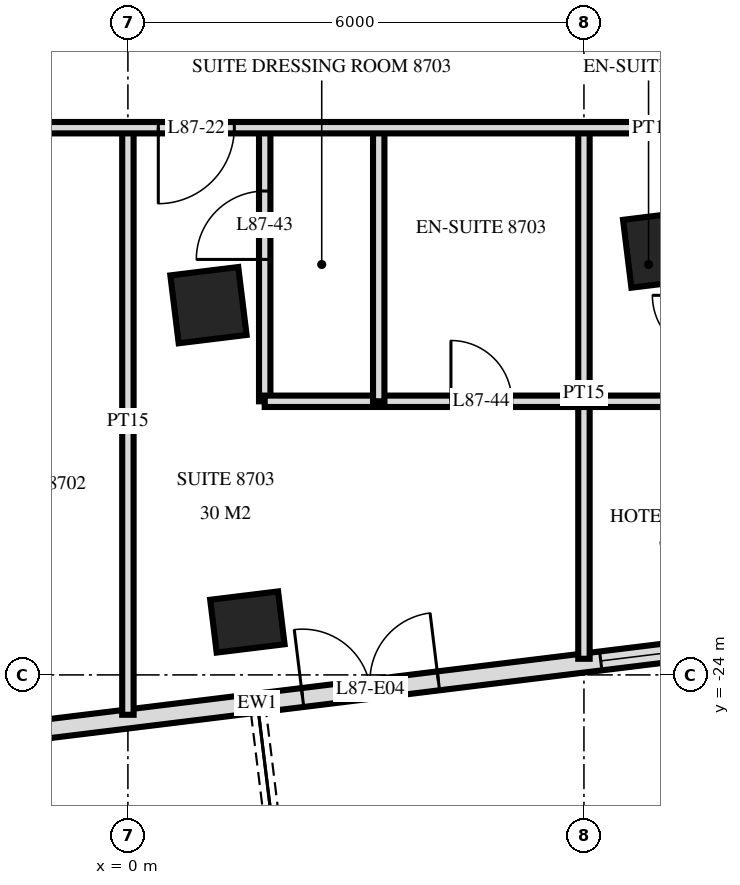
"""IFC4 building model, lengths in metres.
Left out: names, types, materials, properties, quantities, classifications, styles, units other than length and angle.
Written with IfcOpenShell. Run it as: python <this file> out.ifc"""

import sys

from ifc_helpers import new_model, si_unit, direction, frame, frame_2d, origin, origin_2d, place, context, subcontext, project, spatial, rectangle, extrude, element, fill, save


model = new_model("IFC4")
c1 = context("Model", 3, precision=1e-05, world=origin(), true_north=direction((0.0, 1.0)))
c2 = subcontext(c1, "Body", "Model", "MODEL_VIEW")
j1 = project(units=[si_unit("LENGTHUNIT", "METRE"), si_unit("PLANEANGLEUNIT", "RADIAN")], contexts=[c1])
p1 = place(None, origin())
s1 = spatial("IfcSite", under=j1, at=p1, CompositionType="ELEMENT")
p2 = place(p1, origin())
s2 = spatial("IfcBuilding", under=s1, at=p2, CompositionType="ELEMENT")
p3 = place(p2, frame((0.0, 0.0, 330.6)))
s3 = spatial("IfcBuildingStorey", under=s2, at=p3, CompositionType="ELEMENT", Elevation=330.6)
p4 = place(p3, frame((1.06, -19.135, 0.0), z_axis=(0.0, 0.0, 1.0), x_axis=(0.992546151641, 0.121869343405, 0.0)))
e1 = element("IfcColumn", 1, at=p4, inside=s3, PredefinedType="COLUMN", context=c2, shape_type="SweptSolid", body=[
    extrude(rectangle(XDim=0.9, YDim=0.9, at=origin_2d()), origin(), (0.0, 0.0, 1.0), 4.0),
])
p5 = place(p3, frame((1.572, -23.304, 0.0), z_axis=(0.0, 0.0, 1.0), x_axis=(0.992546151641, 0.121869343405, 0.0)))
e2 = element("IfcColumn", 2, at=p5, inside=s3, PredefinedType="COLUMN", context=c2, shape_type="SweptSolid", body=[
    extrude(rectangle(XDim=0.9, YDim=0.7, at=origin_2d()), origin(), (0.0, 0.0, 1.0), 4.0),
])
p6 = place(p3, frame((7.016, -18.404, 0.0), z_axis=(0.0, 0.0, 1.0), x_axis=(0.992546151641, 0.121869343405, 0.0)))
e3 = element("IfcColumn", 3, at=p6, inside=s3, PredefinedType="COLUMN", context=c2, shape_type="SweptSolid", body=[
    extrude(rectangle(XDim=0.9, YDim=0.9, at=origin_2d()), origin(), (0.0, 0.0, 1.0), 4.0),
])
p7 = place(p3, frame((-16.138, -26.561, 0.0), z_axis=(0.0, 0.0, 1.0), x_axis=(0.992546726876, 0.121864658405, 0.0)))
e4 = element("IfcWall", 4, at=p7, inside=s3, PredefinedType="SOLIDWALL", context=c2, shape_type="SweptSolid", body=[
    extrude(rectangle(XDim=35.951, YDim=0.25, at=frame_2d((17.975, 0.0))), origin(), (0.0, 0.0, 1.0), 3.72),
])
p8 = place(p7, frame((0.575, 0.0, 0.0)))
e5 = element("IfcOpeningElement", 5, at=p8, cuts=e4, PredefinedType="OPENING", context=c2, shape_type="SweptSolid", body=[
    extrude(rectangle(XDim=1.8, YDim=2.4, at=frame_2d((0.9, 1.2))), frame((0.0, 0.135, 0.0), z_axis=(0.0, -1.0, 0.0), x_axis=(1.0, 0.0, 0.0)), (0.0, 0.0, 1.0), 0.27),
])
p9 = place(p7, frame((6.576, 0.0, 0.0)))
e6 = element("IfcOpeningElement", 6, at=p9, cuts=e4, PredefinedType="OPENING", context=c2, shape_type="SweptSolid", body=[
    extrude(rectangle(XDim=1.8, YDim=2.4, at=frame_2d((0.9, 1.2))), frame((0.0, 0.135, 0.0), z_axis=(0.0, -1.0, 0.0), x_axis=(1.0, 0.0, 0.0)), (0.0, 0.0, 1.0), 0.27),
])
p10 = place(p7, frame((12.575, 0.0, 0.0)))
e7 = element("IfcOpeningElement", 7, at=p10, cuts=e4, PredefinedType="OPENING", context=c2, shape_type="SweptSolid", body=[
    extrude(rectangle(XDim=1.8, YDim=2.4, at=frame_2d((0.9, 1.2))), frame((0.0, 0.135, 0.0), z_axis=(0.0, -1.0, 0.0), x_axis=(1.0, 0.0, 0.0)), (0.0, 0.0, 1.0), 0.27),
])
p11 = place(p7, frame((18.575, 0.0, 0.0)))
e8 = element("IfcOpeningElement", 8, at=p11, cuts=e4, PredefinedType="OPENING", context=c2, shape_type="SweptSolid", body=[
    extrude(rectangle(XDim=1.8, YDim=2.4, at=frame_2d((0.9, 1.2))), frame((0.0, 0.135, 0.0), z_axis=(0.0, -1.0, 0.0), x_axis=(1.0, 0.0, 0.0)), (0.0, 0.0, 1.0), 0.27),
])
p12 = place(p7, frame((22.528, 0.0, 0.0)))
e9 = element("IfcOpeningElement", 9, at=p12, cuts=e4, PredefinedType="OPENING", context=c2, shape_type="SweptSolid", body=[
    extrude(rectangle(XDim=1.2, YDim=2.4, at=frame_2d((0.6, 1.2))), frame((0.0, 0.135, 0.0), z_axis=(0.0, -1.0, 0.0), x_axis=(1.0, 0.0, 0.0)), (0.0, 0.0, 1.0), 0.27),
])
p13 = place(p7, frame((25.923, 0.0, 0.0)))
e10 = element("IfcOpeningElement", 10, at=p13, cuts=e4, PredefinedType="OPENING", context=c2, shape_type="SweptSolid", body=[
    extrude(rectangle(XDim=1.8, YDim=2.4, at=frame_2d((0.9, 1.2))), frame((0.0, 0.135, 0.0), z_axis=(0.0, -1.0, 0.0), x_axis=(1.0, 0.0, 0.0)), (0.0, 0.0, 1.0), 0.27),
])
p14 = place(p7, frame((30.576, 0.0, 0.0)))
e11 = element("IfcOpeningElement", 11, at=p14, cuts=e4, PredefinedType="OPENING", context=c2, shape_type="SweptSolid", body=[
    extrude(rectangle(XDim=1.8, YDim=2.4, at=frame_2d((0.9, 1.2))), frame((0.0, 0.135, 0.0), z_axis=(0.0, -1.0, 0.0), x_axis=(1.0, 0.0, 0.0)), (0.0, 0.0, 1.0), 0.27),
])
p15 = place(p3, frame((6.0, -23.788, 0.0), z_axis=(0.0, 0.0, 1.0), x_axis=(0.0, 1.0, 0.0)))
e12 = element("IfcWall", 12, at=p15, inside=s3, PredefinedType="PARTITIONING", context=c2, shape_type="SweptSolid", body=[
    extrude(rectangle(XDim=6.988, YDim=0.15, at=frame_2d((3.494, 0.0))), origin(), (0.0, 0.0, 1.0), 3.72),
])
p16 = place(p3, frame((3.3, -20.4, 0.0), z_axis=(0.0, 0.0, 1.0), x_axis=(0.0, 1.0, 0.0)))
e13 = element("IfcWall", 13, at=p16, inside=s3, PredefinedType="PARTITIONING", context=c2, shape_type="SweptSolid", body=[
    extrude(rectangle(XDim=3.6, YDim=0.15, at=frame_2d((1.8, 0.0))), origin(), (0.0, 0.0, 1.0), 3.72),
])
p17 = place(p3, frame((1.8, -20.4, 0.0), z_axis=(0.0, 0.0, 1.0), x_axis=(0.0, 1.0, 0.0)))
e14 = element("IfcWall", 14, at=p17, inside=s3, PredefinedType="PARTITIONING", context=c2, shape_type="SweptSolid", body=[
    extrude(rectangle(XDim=3.6, YDim=0.15, at=frame_2d((1.8, 0.0))), origin(), (0.0, 0.0, 1.0), 3.72),
])
p18 = place(p17, frame((1.866, 0.0, 0.0)))
e15 = element("IfcOpeningElement", 15, at=p18, cuts=e14, PredefinedType="OPENING", context=c2, shape_type="SweptSolid", body=[
    extrude(rectangle(XDim=0.9, YDim=2.1, at=frame_2d((0.45, 1.05))), frame((0.0, 0.085, 0.0), z_axis=(0.0, -1.0, 0.0), x_axis=(1.0, 0.0, 0.0)), (0.0, 0.0, 1.0), 0.17),
])
p19 = place(p3, frame((0.0, -24.524, 0.0), z_axis=(0.0, 0.0, 1.0), x_axis=(0.0, 1.0, 0.0)))
e16 = element("IfcWall", 16, at=p19, inside=s3, PredefinedType="PARTITIONING", context=c2, shape_type="SweptSolid", body=[
    extrude(rectangle(XDim=7.724, YDim=0.15, at=frame_2d((3.862, 0.0))), origin(), (0.0, 0.0, 1.0), 3.72),
])
p20 = place(p3, frame((1.8, -20.4, 0.0), z_axis=(0.0, 0.0, 1.0), x_axis=(1.0, 0.0, 0.0)))
e17 = element("IfcWall", 17, at=p20, inside=s3, PredefinedType="PARTITIONING", context=c2, shape_type="SweptSolid", body=[
    extrude(rectangle(XDim=5.9, YDim=0.15, at=frame_2d((2.95, 0.0))), origin(), (0.0, 0.0, 1.0), 3.72),
])
p21 = place(p20, frame((2.45, 0.0, 0.0)))
e18 = element("IfcOpeningElement", 18, at=p21, cuts=e17, PredefinedType="OPENING", context=c2, shape_type="SweptSolid", body=[
    extrude(rectangle(XDim=0.8, YDim=2.1, at=frame_2d((0.4, 1.05))), frame((0.0, 0.085, 0.0), z_axis=(0.0, -1.0, 0.0), x_axis=(1.0, 0.0, 0.0)), (0.0, 0.0, 1.0), 0.17),
])
p22 = place(p3, frame((-9.3, -16.8, 0.0), z_axis=(0.0, 0.0, 1.0), x_axis=(1.0, 0.0, 0.0)))
e19 = element("IfcWall", 19, at=p22, inside=s3, PredefinedType="PARTITIONING", context=c2, shape_type="SweptSolid", body=[
    extrude(rectangle(XDim=32.561, YDim=0.15, at=frame_2d((16.281, 0.0))), origin(), (0.0, 0.0, 1.0), 3.72),
])
p23 = place(p22, frame((0.4, 0.0, 0.0)))
e20 = element("IfcOpeningElement", 20, at=p23, cuts=e19, PredefinedType="OPENING", context=c2, shape_type="SweptSolid", body=[
    extrude(rectangle(XDim=1.0, YDim=2.1, at=frame_2d((0.5, 1.05))), frame((0.0, 0.085, 0.0), z_axis=(0.0, -1.0, 0.0), x_axis=(1.0, 0.0, 0.0)), (0.0, 0.0, 1.0), 0.17),
])
p24 = place(p22, frame((7.15, 0.0, 0.0)))
e21 = element("IfcOpeningElement", 21, at=p24, cuts=e19, PredefinedType="OPENING", context=c2, shape_type="SweptSolid", body=[
    extrude(rectangle(XDim=1.0, YDim=2.1, at=frame_2d((0.5, 1.05))), frame((0.0, 0.085, 0.0), z_axis=(0.0, -1.0, 0.0), x_axis=(1.0, 0.0, 0.0)), (0.0, 0.0, 1.0), 0.17),
])
p25 = place(p22, frame((9.7, 0.0, 0.0)))
e22 = element("IfcOpeningElement", 22, at=p25, cuts=e19, PredefinedType="OPENING", context=c2, shape_type="SweptSolid", body=[
    extrude(rectangle(XDim=1.0, YDim=2.1, at=frame_2d((0.5, 1.05))), frame((0.0, 0.085, 0.0), z_axis=(0.0, -1.0, 0.0), x_axis=(1.0, 0.0, 0.0)), (0.0, 0.0, 1.0), 0.17),
])
p26 = place(p22, frame((17.149, 0.0, 0.0)))
e23 = element("IfcOpeningElement", 23, at=p26, cuts=e19, PredefinedType="OPENING", context=c2, shape_type="SweptSolid", body=[
    extrude(rectangle(XDim=1.0, YDim=2.1, at=frame_2d((0.5, 1.05))), frame((0.0, 0.085, 0.0), z_axis=(0.0, -1.0, 0.0), x_axis=(1.0, 0.0, 0.0)), (0.0, 0.0, 1.0), 0.17),
])
p27 = place(p22, frame((18.45, 0.0, 0.0)))
e24 = element("IfcOpeningElement", 24, at=p27, cuts=e19, PredefinedType="OPENING", context=c2, shape_type="SweptSolid", body=[
    extrude(rectangle(XDim=1.0, YDim=2.1, at=frame_2d((0.5, 1.05))), frame((0.0, 0.085, 0.0), z_axis=(0.0, -1.0, 0.0), x_axis=(1.0, 0.0, 0.0)), (0.0, 0.0, 1.0), 0.17),
])
p28 = place(p22, frame((24.98, 0.0, 0.0)))
e25 = element("IfcOpeningElement", 25, at=p28, cuts=e19, PredefinedType="OPENING", context=c2, shape_type="SweptSolid", body=[
    extrude(rectangle(XDim=1.0, YDim=2.1, at=frame_2d((0.5, 1.05))), frame((0.0, 0.085, 0.0), z_axis=(0.0, -1.0, 0.0), x_axis=(1.0, 0.0, 0.0)), (0.0, 0.0, 1.0), 0.17),
])
p29 = place(p11, origin())
e26 = element("IfcDoor", 26, at=p29, inside=s3, OperationType="DOUBLE_DOOR_SINGLE_SWING", PredefinedType="DOOR", context=c2, shape_type="SweptSolid", body=[
    extrude(rectangle(XDim=1.8, YDim=2.4, at=frame_2d((0.9, 1.2))), frame((0.0, 0.025, 0.0), z_axis=(0.0, -1.0, 0.0), x_axis=(1.0, 0.0, 0.0)), (0.0, 0.0, 1.0), 0.05),
])
fill(e8, e26)
p30 = place(p12, origin())
e27 = element("IfcWindow", 27, at=p30, inside=s3, PartitioningType="SINGLE_PANEL", PredefinedType="WINDOW", context=c2, shape_type="SweptSolid", body=[
    extrude(rectangle(XDim=1.2, YDim=2.4, at=frame_2d((0.6, 1.2))), frame((0.0, 0.03, 0.0), z_axis=(0.0, -1.0, 0.0), x_axis=(1.0, 0.0, 0.0)), (0.0, 0.0, 1.0), 0.06),
])
fill(e9, e27)
p31 = place(p25, frame((0.5, 0.0, 0.0), z_axis=(0.0, 0.0, 1.0), x_axis=(-1.0, 0.0, 0.0)))
e28 = element("IfcDoor", 28, at=p31, inside=s3, OperationType="SINGLE_SWING_LEFT", PredefinedType="DOOR", context=c2, shape_type="SweptSolid", body=[
    extrude(rectangle(XDim=1.0, YDim=2.1, at=frame_2d((0.0, 1.05))), frame((0.0, -0.025, 0.0), z_axis=(0.0, 1.0, 0.0), x_axis=(-1.0, 0.0, 0.0)), (0.0, 0.0, 1.0), 0.05),
])
fill(e22, e28)
p32 = place(p18, origin())
e29 = element("IfcDoor", 29, at=p32, inside=s3, OperationType="SINGLE_SWING_RIGHT", PredefinedType="DOOR", context=c2, shape_type="SweptSolid", body=[
    extrude(rectangle(XDim=0.9, YDim=2.1, at=frame_2d((0.45, 1.05))), frame((0.0, 0.025, 0.0), z_axis=(0.0, -1.0, 0.0), x_axis=(1.0, 0.0, 0.0)), (0.0, 0.0, 1.0), 0.05),
])
fill(e15, e29)
p33 = place(p21, origin())
e30 = element("IfcDoor", 30, at=p33, inside=s3, OperationType="SINGLE_SWING_RIGHT", PredefinedType="DOOR", context=c2, shape_type="SweptSolid", body=[
    extrude(rectangle(XDim=0.8, YDim=2.1, at=frame_2d((0.4, 1.05))), frame((0.0, 0.025, 0.0), z_axis=(0.0, -1.0, 0.0), x_axis=(1.0, 0.0, 0.0)), (0.0, 0.0, 1.0), 0.05),
])
fill(e18, e30)
save(model, sys.argv[1])
